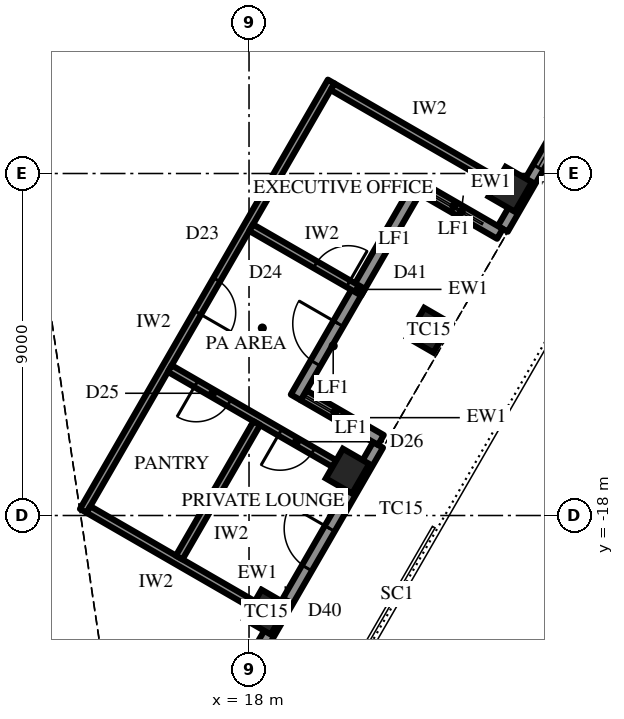
"""IFC4 building model, lengths in metres.
Left out: names, types, materials, properties, quantities, classifications, styles, units other than length and angle.
Written with IfcOpenShell. Run it as: python <this file> out.ifc"""

import sys

from ifc_helpers import new_model, si_unit, direction, frame, frame_2d, origin, origin_2d, place, context, subcontext, project, spatial, rectangle, extrude, element, fill, save


model = new_model("IFC4")
c1 = context("Model", 3, precision=1e-05, world=origin(), true_north=direction((0.0, 1.0)))
c2 = subcontext(c1, "Body", "Model", "MODEL_VIEW")
j1 = project(units=[si_unit("LENGTHUNIT", "METRE"), si_unit("PLANEANGLEUNIT", "RADIAN")], contexts=[c1])
p1 = place(None, origin())
s1 = spatial("IfcSite", under=j1, at=p1, CompositionType="ELEMENT")
p2 = place(p1, origin())
s2 = spatial("IfcBuilding", under=s1, at=p2, CompositionType="ELEMENT")
p3 = place(p2, frame((0.0, 0.0, 357.7)))
s3 = spatial("IfcBuildingStorey", under=s2, at=p3, CompositionType="ELEMENT", Elevation=357.7)
for number, where, z_axis, x_axis in (
    (1, (18.451, -20.542, 0.0), (0.0, 0.0, 1.0), (0.5, 0.866, 0.0)),
    (2, (20.592, -16.833, 0.0), (0.0, 0.0, 1.0), (0.5, 0.866, 0.0)),
    (3, (22.733, -13.125, 0.0), (0.0, 0.0, 1.0), (0.5, 0.866, 0.0)),
    (4, (24.874, -9.417, 0.0), (0.0, 0.0, 1.0), (0.5, 0.866, 0.0)),
):
    element("IfcColumn", number, at=place(p3, frame(where, z_axis=z_axis, x_axis=x_axis)), inside=s3, PredefinedType="COLUMN", context=c2, shape_type="SweptSolid", body=[
        extrude(rectangle(XDim=0.9, YDim=0.8, at=origin_2d()), origin(), (0.0, 0.0, 1.0), 4.2),
    ])
p4 = place(p3, frame((16.613, -24.425, 0.0), z_axis=(0.0, 0.0, 1.0), x_axis=(0.499996453679, 0.866027451244, 0.0)))
e5 = element("IfcWall", 5, at=p4, inside=s3, PredefinedType="SOLIDWALL", context=c2, shape_type="SweptSolid", body=[
    extrude(rectangle(XDim=9.564, YDim=0.3, at=frame_2d((4.782, 0.0))), origin(), (0.0, 0.0, 1.0), 2.9),
])
p5 = place(p4, frame((0.866, 0.0, 0.6)))
e6 = element("IfcOpeningElement", 6, at=p5, cuts=e5, PredefinedType="OPENING", context=c2, shape_type="SweptSolid", body=[
    extrude(rectangle(XDim=2.55, YDim=2.05, at=frame_2d((1.275, 1.025))), frame((0.0, 0.16, 0.0), z_axis=(0.0, -1.0, 0.0), x_axis=(1.0, 0.0, 0.0)), (0.0, 0.0, 1.0), 0.32),
])
p6 = place(p4, frame((5.823, 0.0, 0.0)))
e7 = element("IfcOpeningElement", 7, at=p6, cuts=e5, PredefinedType="OPENING", context=c2, shape_type="SweptSolid", body=[
    extrude(rectangle(XDim=1.2, YDim=2.4, at=frame_2d((0.6, 1.2))), frame((0.0, 0.16, 0.0), z_axis=(0.0, -1.0, 0.0), x_axis=(1.0, 0.0, 0.0)), (0.0, 0.0, 1.0), 0.32),
])
p7 = place(p3, frame((24.677, -10.458, 0.0), z_axis=(0.0, 0.0, 1.0), x_axis=(0.499996453679, 0.866027451244, 0.0)))
e8 = element("IfcWall", 8, at=p7, inside=s3, PredefinedType="SOLIDWALL", context=c2, shape_type="SweptSolid", body=[
    extrude(rectangle(XDim=9.564, YDim=0.3, at=frame_2d((4.782, 0.0))), origin(), (0.0, 0.0, 1.0), 2.9),
])
p8 = place(p7, frame((1.866, 0.0, 0.6)))
e9 = element("IfcOpeningElement", 9, at=p8, cuts=e8, PredefinedType="OPENING", context=c2, shape_type="SweptSolid", body=[
    extrude(rectangle(XDim=2.55, YDim=2.05, at=frame_2d((1.275, 1.025))), frame((0.0, 0.16, 0.0), z_axis=(0.0, -1.0, 0.0), x_axis=(1.0, 0.0, 0.0)), (0.0, 0.0, 1.0), 0.32),
])
p9 = place(p7, frame((6.148, 0.0, 0.6)))
e10 = element("IfcOpeningElement", 10, at=p9, cuts=e8, PredefinedType="OPENING", context=c2, shape_type="SweptSolid", body=[
    extrude(rectangle(XDim=2.55, YDim=2.05, at=frame_2d((1.275, 1.025))), frame((0.0, 0.16, 0.0), z_axis=(0.0, -1.0, 0.0), x_axis=(1.0, 0.0, 0.0)), (0.0, 0.0, 1.0), 0.32),
])
for number, where, z_axis, x_axis in (
    (11, (21.47, -16.012, 0.0), (0.0, 0.0, 1.0), (-0.866, 0.5, 0.0)),
    (12, (24.602, -10.588, 0.0), (0.0, 0.0, 1.0), (-0.866, 0.5, 0.0)),
):
    element("IfcWall", number, at=place(p3, frame(where, z_axis=z_axis, x_axis=x_axis)), inside=s3, PredefinedType="SOLIDWALL", context=c2, shape_type="SweptSolid", body=[
        extrude(rectangle(XDim=2.35, YDim=0.3, at=frame_2d((1.175, 0.0))), origin(), (0.0, 0.0, 1.0), 2.9),
    ])
p10 = place(p3, frame((19.23, -14.892, 0.0), z_axis=(0.0, 0.0, 1.0), x_axis=(0.499999339774, 0.866025784966, 0.0)))
e13 = element("IfcWall", 13, at=p10, inside=s3, PredefinedType="SOLIDWALL", context=c2, shape_type="SweptSolid", body=[
    extrude(rectangle(XDim=6.564, YDim=0.3, at=frame_2d((3.282, 0.0))), origin(), (0.0, 0.0, 1.0), 2.9),
])
p11 = place(p10, frame((1.041, 0.0, 0.0)))
e14 = element("IfcOpeningElement", 14, at=p11, cuts=e13, PredefinedType="OPENING", context=c2, shape_type="SweptSolid", body=[
    extrude(rectangle(XDim=1.2, YDim=2.4, at=frame_2d((0.6, 1.2))), frame((0.0, 0.16, 0.0), z_axis=(0.0, -1.0, 0.0), x_axis=(1.0, 0.0, 0.0)), (0.0, 0.0, 1.0), 0.32),
])
p12 = place(p3, frame((13.638, -17.878, 0.0), z_axis=(0.0, 0.0, 1.0), x_axis=(0.500013496215, 0.866017611601, 0.0)))
e15 = element("IfcWall", 15, at=p12, inside=s3, PredefinedType="PARTITIONING", context=c2, shape_type="SweptSolid", body=[
    extrude(rectangle(XDim=13.046, YDim=0.2, at=frame_2d((6.523, 0.0))), origin(), (0.0, 0.0, 1.0), 4.0),
])
p13 = place(p12, frame((6.023, 0.0, 0.0)))
e16 = element("IfcOpeningElement", 16, at=p13, cuts=e15, PredefinedType="OPENING", context=c2, shape_type="SweptSolid", body=[
    extrude(rectangle(XDim=1.0, YDim=2.2, at=frame_2d((0.5, 1.1))), frame((0.0, 0.11, 0.0), z_axis=(0.0, -1.0, 0.0), x_axis=(1.0, 0.0, 0.0)), (0.0, 0.0, 1.0), 0.22),
])
p14 = place(p3, frame((13.775, -17.842, 0.0), z_axis=(0.0, 0.0, 1.0), x_axis=(0.866022959057, -0.500004234368, 0.0)))
e17 = element("IfcWall", 17, at=p14, inside=s3, PredefinedType="PARTITIONING", context=c2, shape_type="SweptSolid", body=[
    extrude(rectangle(XDim=5.0, YDim=0.2, at=frame_2d((2.5, 0.0))), origin(), (0.0, 0.0, 1.0), 3.082),
])
p15 = place(p3, frame((15.916, -14.133, 0.0), z_axis=(0.0, 0.0, 1.0), x_axis=(0.866035165624, -0.499983091616, 0.0)))
e18 = element("IfcWall", 18, at=p15, inside=s3, PredefinedType="PARTITIONING", context=c2, shape_type="SweptSolid", body=[
    extrude(rectangle(XDim=5.0, YDim=0.2, at=frame_2d((2.5, 0.0))), origin(), (0.0, 0.0, 1.0), 3.082),
])
p16 = place(p15, frame((0.8, 0.0, 0.0)))
e19 = element("IfcOpeningElement", 19, at=p16, cuts=e18, PredefinedType="OPENING", context=c2, shape_type="SweptSolid", body=[
    extrude(rectangle(XDim=1.0, YDim=2.2, at=frame_2d((0.5, 1.1))), frame((0.0, 0.11, 0.0), z_axis=(0.0, -1.0, 0.0), x_axis=(1.0, 0.0, 0.0)), (0.0, 0.0, 1.0), 0.22),
])
p17 = place(p15, frame((3.35, 0.0, 0.0)))
e20 = element("IfcOpeningElement", 20, at=p17, cuts=e18, PredefinedType="OPENING", context=c2, shape_type="SweptSolid", body=[
    extrude(rectangle(XDim=1.0, YDim=2.2, at=frame_2d((0.5, 1.1))), frame((0.0, 0.11, 0.0), z_axis=(0.0, -1.0, 0.0), x_axis=(1.0, 0.0, 0.0)), (0.0, 0.0, 1.0), 0.22),
])
p18 = place(p3, frame((18.057, -10.425, 0.0), z_axis=(0.0, 0.0, 1.0), x_axis=(0.866030179784, -0.499991727635, 0.0)))
e21 = element("IfcWall", 21, at=p18, inside=s3, PredefinedType="PARTITIONING", context=c2, shape_type="SweptSolid", body=[
    extrude(rectangle(XDim=3.401, YDim=0.2, at=frame_2d((1.7, 0.0))), origin(), (0.0, 0.0, 1.0), 3.082),
])
p19 = place(p18, frame((1.95, 0.0, 0.0)))
e22 = element("IfcOpeningElement", 22, at=p19, cuts=e21, PredefinedType="OPENING", context=c2, shape_type="SweptSolid", body=[
    extrude(rectangle(XDim=1.0, YDim=2.2, at=frame_2d((0.5, 1.1))), frame((0.0, 0.11, 0.0), z_axis=(0.0, -1.0, 0.0), x_axis=(1.0, 0.0, 0.0)), (0.0, 0.0, 1.0), 0.22),
])
p20 = place(p3, frame((20.198, -6.717, 0.0), z_axis=(0.0, 0.0, 1.0), x_axis=(0.866022959057, -0.500004234368, 0.0)))
e23 = element("IfcWall", 23, at=p20, inside=s3, PredefinedType="PARTITIONING", context=c2, shape_type="SweptSolid", body=[
    extrude(rectangle(XDim=5.0, YDim=0.2, at=frame_2d((2.5, 0.0))), origin(), (0.0, 0.0, 1.0), 2.992),
])
p21 = place(p3, frame((16.163, -19.105, 0.0), z_axis=(0.0, 0.0, 1.0), x_axis=(0.499998569178, 0.866026229868, 0.0)))
e24 = element("IfcWall", 24, at=p21, inside=s3, PredefinedType="PARTITIONING", context=c2, shape_type="SweptSolid", body=[
    extrude(rectangle(XDim=4.082, YDim=0.2, at=frame_2d((2.041, 0.0))), origin(), (0.0, 0.0, 1.0), 4.0),
])
p22 = place(p6, origin())
e25 = element("IfcDoor", 25, at=p22, inside=s3, OperationType="SINGLE_SWING_LEFT", PredefinedType="DOOR", context=c2, shape_type="SweptSolid", body=[
    extrude(rectangle(XDim=1.2, YDim=2.4, at=frame_2d((0.6, 1.2))), frame((0.0, 0.025, 0.0), z_axis=(0.0, -1.0, 0.0), x_axis=(1.0, 0.0, 0.0)), (0.0, 0.0, 1.0), 0.05),
])
fill(e7, e25)
p23 = place(p8, origin())
e26 = element("IfcWindow", 26, at=p23, inside=s3, PartitioningType="SINGLE_PANEL", PredefinedType="WINDOW", context=c2, shape_type="SweptSolid", body=[
    extrude(rectangle(XDim=2.55, YDim=2.05, at=frame_2d((1.275, 1.025))), frame((0.0, 0.03, 0.0), z_axis=(0.0, -1.0, 0.0), x_axis=(1.0, 0.0, 0.0)), (0.0, 0.0, 1.0), 0.06),
])
fill(e9, e26)
p24 = place(p11, origin())
e27 = element("IfcDoor", 27, at=p24, inside=s3, OperationType="SINGLE_SWING_LEFT", PredefinedType="DOOR", context=c2, shape_type="SweptSolid", body=[
    extrude(rectangle(XDim=1.2, YDim=2.4, at=frame_2d((0.6, 1.2))), frame((0.0, 0.025, 0.0), z_axis=(0.0, -1.0, 0.0), x_axis=(1.0, 0.0, 0.0)), (0.0, 0.0, 1.0), 0.05),
])
fill(e14, e27)
p25 = place(p16, frame((1.0, 0.0, 0.0), z_axis=(0.0, 0.0, 1.0), x_axis=(-1.0, 0.0, 0.0)))
e28 = element("IfcDoor", 28, at=p25, inside=s3, OperationType="SINGLE_SWING_LEFT", PredefinedType="DOOR", context=c2, shape_type="SweptSolid", body=[
    extrude(rectangle(XDim=1.0, YDim=2.2, at=frame_2d((0.5, 1.1))), frame((0.0, 0.025, 0.0), z_axis=(0.0, -1.0, 0.0), x_axis=(1.0, 0.0, 0.0)), (0.0, 0.0, 1.0), 0.05),
])
fill(e19, e28)
p26 = place(p17, frame((1.0, 0.0, 0.0), z_axis=(0.0, 0.0, 1.0), x_axis=(-1.0, 0.0, 0.0)))
e29 = element("IfcDoor", 29, at=p26, inside=s3, OperationType="SINGLE_SWING_LEFT", PredefinedType="DOOR", context=c2, shape_type="SweptSolid", body=[
    extrude(rectangle(XDim=1.0, YDim=2.2, at=frame_2d((0.5, 1.1))), frame((0.0, 0.025, 0.0), z_axis=(0.0, -1.0, 0.0), x_axis=(1.0, 0.0, 0.0)), (0.0, 0.0, 1.0), 0.05),
])
fill(e20, e29)
p27 = place(p13, frame((1.0, 0.0, 0.0), z_axis=(0.0, 0.0, 1.0), x_axis=(-1.0, 0.0, 0.0)))
e30 = element("IfcDoor", 30, at=p27, inside=s3, OperationType="SINGLE_SWING_LEFT", PredefinedType="DOOR", context=c2, shape_type="SweptSolid", body=[
    extrude(rectangle(XDim=1.0, YDim=2.2, at=frame_2d((0.5, 1.1))), frame((0.0, 0.025, 0.0), z_axis=(0.0, -1.0, 0.0), x_axis=(1.0, 0.0, 0.0)), (0.0, 0.0, 1.0), 0.05),
])
fill(e16, e30)
p28 = place(p19, origin())
e31 = element("IfcDoor", 31, at=p28, inside=s3, OperationType="SINGLE_SWING_LEFT", PredefinedType="DOOR", context=c2, shape_type="SweptSolid", body=[
    extrude(rectangle(XDim=1.0, YDim=2.2, at=frame_2d((0.5, 1.1))), frame((0.0, 0.025, 0.0), z_axis=(0.0, -1.0, 0.0), x_axis=(1.0, 0.0, 0.0)), (0.0, 0.0, 1.0), 0.05),
])
fill(e22, e31)
save(model, sys.argv[1])
